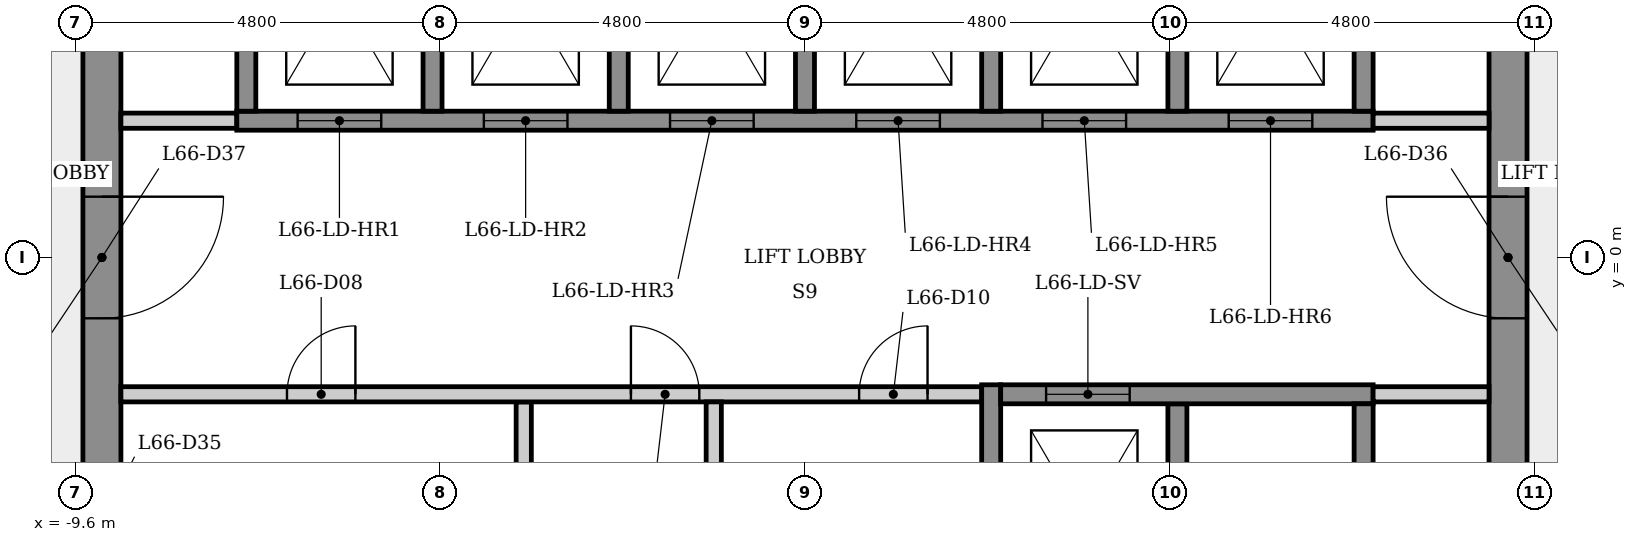
"""IFC4 building model, lengths in metres.
Left out: names, types, materials, properties, quantities, classifications, styles, units other than length and angle.
Written with IfcOpenShell. Run it as: python <this file> out.ifc"""

import sys

from ifc_helpers import new_model, si_unit, direction, frame, frame_2d, origin, place, context, subcontext, project, spatial, rectangle, extrude, element, fill, save


model = new_model("IFC4")
c1 = context("Model", 3, precision=1e-05, world=origin(), true_north=direction((0.0, 1.0)))
c2 = subcontext(c1, "Body", "Model", "MODEL_VIEW")
j1 = project(units=[si_unit("LENGTHUNIT", "METRE"), si_unit("PLANEANGLEUNIT", "RADIAN")], contexts=[c1])
p1 = place(None, origin())
s1 = spatial("IfcSite", under=j1, at=p1, CompositionType="ELEMENT")
p2 = place(p1, origin())
s2 = spatial("IfcBuilding", under=s1, at=p2, CompositionType="ELEMENT")
p3 = place(p2, frame((0.0, 0.0, 246.1)))
s3 = spatial("IfcBuildingStorey", under=s2, at=p3, CompositionType="ELEMENT", Elevation=246.1)
p4 = place(p3, frame((9.25, -5.485, 0.0), z_axis=(0.0, 0.0, 1.0), x_axis=(0.0, 1.0, 0.0)))
e1 = element("IfcWall", 1, at=p4, inside=s3, PredefinedType="SHEAR", context=c2, shape_type="SweptSolid", body=[
    extrude(rectangle(XDim=10.97, YDim=0.5, at=frame_2d((5.485, 0.0))), origin(), (0.0, 0.0, 1.0), 3.4),
])
p5 = place(p4, frame((4.685, 0.0, 0.0)))
e2 = element("IfcOpeningElement", 2, at=p5, cuts=e1, PredefinedType="OPENING", context=c2, shape_type="SweptSolid", body=[
    extrude(rectangle(XDim=1.6, YDim=2.1, at=frame_2d((0.8, 1.05))), frame((0.0, 0.26, 0.0), z_axis=(0.0, -1.0, 0.0), x_axis=(1.0, 0.0, 0.0)), (0.0, 0.0, 1.0), 0.52),
])
p6 = place(p3, frame((-9.25, 5.485, 0.0), z_axis=(0.0, 0.0, 1.0), x_axis=(0.0, -1.0, 0.0)))
e3 = element("IfcWall", 3, at=p6, inside=s3, PredefinedType="SHEAR", context=c2, shape_type="SweptSolid", body=[
    extrude(rectangle(XDim=10.97, YDim=0.5, at=frame_2d((5.485, 0.0))), origin(), (0.0, 0.0, 1.0), 3.4),
])
p7 = place(p6, frame((8.51, 0.0, 0.0)))
e4 = element("IfcOpeningElement", 4, at=p7, cuts=e3, PredefinedType="OPENING", context=c2, shape_type="SweptSolid", body=[
    extrude(rectangle(XDim=0.9, YDim=2.1, at=frame_2d((0.45, 1.05))), frame((0.0, 0.26, 0.0), z_axis=(0.0, -1.0, 0.0), x_axis=(1.0, 0.0, 0.0)), (0.0, 0.0, 1.0), 0.52),
])
p8 = place(p6, frame((4.685, 0.0, 0.0)))
e5 = element("IfcOpeningElement", 5, at=p8, cuts=e3, PredefinedType="OPENING", context=c2, shape_type="SweptSolid", body=[
    extrude(rectangle(XDim=1.6, YDim=2.1, at=frame_2d((0.8, 1.05))), frame((0.0, 0.26, 0.0), z_axis=(0.0, -1.0, 0.0), x_axis=(1.0, 0.0, 0.0)), (0.0, 0.0, 1.0), 0.52),
])
p9 = place(p3, frame((-9.0, 1.8, 0.0), z_axis=(0.0, 0.0, 1.0), x_axis=(1.0, 0.0, 0.0)))
e6 = element("IfcWall", 6, at=p9, inside=s3, PredefinedType="PARTITIONING", context=c2, shape_type="SweptSolid", body=[
    extrude(rectangle(XDim=1.525, YDim=0.2, at=frame_2d((0.763, 0.0))), origin(), (0.0, 0.0, 1.0), 3.05),
])
p10 = place(p3, frame((-7.475, 1.8, 0.0), z_axis=(0.0, 0.0, 1.0), x_axis=(1.0, 0.0, 0.0)))
e7 = element("IfcWall", 7, at=p10, inside=s3, PredefinedType="SHEAR", context=c2, shape_type="SweptSolid", body=[
    extrude(rectangle(XDim=14.95, YDim=0.25, at=frame_2d((7.475, 0.0))), origin(), (0.0, 0.0, 1.0), 3.05),
])
p11 = place(p10, frame((0.8, 0.0, 0.0)))
e8 = element("IfcOpeningElement", 8, at=p11, cuts=e7, PredefinedType="OPENING", context=c2, shape_type="SweptSolid", body=[
    extrude(rectangle(XDim=1.1, YDim=2.1, at=frame_2d((0.55, 1.05))), frame((0.0, 0.135, 0.0), z_axis=(0.0, -1.0, 0.0), x_axis=(1.0, 0.0, 0.0)), (0.0, 0.0, 1.0), 0.27),
])
p12 = place(p10, frame((3.25, 0.0, 0.0)))
e9 = element("IfcOpeningElement", 9, at=p12, cuts=e7, PredefinedType="OPENING", context=c2, shape_type="SweptSolid", body=[
    extrude(rectangle(XDim=1.1, YDim=2.1, at=frame_2d((0.55, 1.05))), frame((0.0, 0.135, 0.0), z_axis=(0.0, -1.0, 0.0), x_axis=(1.0, 0.0, 0.0)), (0.0, 0.0, 1.0), 0.27),
])
p13 = place(p10, frame((5.7, 0.0, 0.0)))
e10 = element("IfcOpeningElement", 10, at=p13, cuts=e7, PredefinedType="OPENING", context=c2, shape_type="SweptSolid", body=[
    extrude(rectangle(XDim=1.1, YDim=2.1, at=frame_2d((0.55, 1.05))), frame((0.0, 0.135, 0.0), z_axis=(0.0, -1.0, 0.0), x_axis=(1.0, 0.0, 0.0)), (0.0, 0.0, 1.0), 0.27),
])
p14 = place(p10, frame((8.15, 0.0, 0.0)))
e11 = element("IfcOpeningElement", 11, at=p14, cuts=e7, PredefinedType="OPENING", context=c2, shape_type="SweptSolid", body=[
    extrude(rectangle(XDim=1.1, YDim=2.1, at=frame_2d((0.55, 1.05))), frame((0.0, 0.135, 0.0), z_axis=(0.0, -1.0, 0.0), x_axis=(1.0, 0.0, 0.0)), (0.0, 0.0, 1.0), 0.27),
])
p15 = place(p10, frame((10.6, 0.0, 0.0)))
e12 = element("IfcOpeningElement", 12, at=p15, cuts=e7, PredefinedType="OPENING", context=c2, shape_type="SweptSolid", body=[
    extrude(rectangle(XDim=1.1, YDim=2.1, at=frame_2d((0.55, 1.05))), frame((0.0, 0.135, 0.0), z_axis=(0.0, -1.0, 0.0), x_axis=(1.0, 0.0, 0.0)), (0.0, 0.0, 1.0), 0.27),
])
p16 = place(p10, frame((13.05, 0.0, 0.0)))
e13 = element("IfcOpeningElement", 13, at=p16, cuts=e7, PredefinedType="OPENING", context=c2, shape_type="SweptSolid", body=[
    extrude(rectangle(XDim=1.1, YDim=2.1, at=frame_2d((0.55, 1.05))), frame((0.0, 0.135, 0.0), z_axis=(0.0, -1.0, 0.0), x_axis=(1.0, 0.0, 0.0)), (0.0, 0.0, 1.0), 0.27),
])
p17 = place(p3, frame((-7.35, 1.925, 0.0), z_axis=(0.0, 0.0, 1.0), x_axis=(0.0, 1.0, 0.0)))
e14 = element("IfcWall", 14, at=p17, inside=s3, PredefinedType="SHEAR", context=c2, shape_type="SweptSolid", body=[
    extrude(rectangle(XDim=3.35, YDim=0.25, at=frame_2d((1.675, 0.0))), origin(), (0.0, 0.0, 1.0), 3.05),
])
p18 = place(p3, frame((-4.9, 5.025, 0.0), z_axis=(0.0, 0.0, 1.0), x_axis=(0.0, -1.0, 0.0)))
e15 = element("IfcWall", 15, at=p18, inside=s3, PredefinedType="SHEAR", context=c2, shape_type="SweptSolid", body=[
    extrude(rectangle(XDim=3.1, YDim=0.25, at=frame_2d((1.55, 0.0))), origin(), (0.0, 0.0, 1.0), 3.4),
])
p19 = place(p3, frame((-3.7, -1.9, 0.0), z_axis=(0.0, 0.0, 1.0), x_axis=(0.0, -1.0, 0.0)))
e16 = element("IfcWall", 16, at=p19, inside=s3, PredefinedType="PARTITIONING", context=c2, shape_type="SweptSolid", body=[
    extrude(rectangle(XDim=3.15, YDim=0.2, at=frame_2d((1.575, 0.0))), origin(), (0.0, 0.0, 1.0), 3.05),
])
p20 = place(p3, frame((-9.0, -1.8, 0.0), z_axis=(0.0, 0.0, 1.0), x_axis=(1.0, 0.0, 0.0)))
e17 = element("IfcWall", 17, at=p20, inside=s3, PredefinedType="PARTITIONING", context=c2, shape_type="SweptSolid", body=[
    extrude(rectangle(XDim=11.325, YDim=0.2, at=frame_2d((5.663, 0.0))), origin(), (0.0, 0.0, 1.0), 3.05),
])
p21 = place(p20, frame((2.185, 0.0, 0.0)))
e18 = element("IfcOpeningElement", 18, at=p21, cuts=e17, PredefinedType="OPENING", context=c2, shape_type="SweptSolid", body=[
    extrude(rectangle(XDim=0.9, YDim=2.1, at=frame_2d((0.45, 1.05))), frame((0.0, 0.11, 0.0), z_axis=(0.0, -1.0, 0.0), x_axis=(1.0, 0.0, 0.0)), (0.0, 0.0, 1.0), 0.22),
])
p22 = place(p20, frame((6.71, 0.0, 0.0)))
e19 = element("IfcOpeningElement", 19, at=p22, cuts=e17, PredefinedType="OPENING", context=c2, shape_type="SweptSolid", body=[
    extrude(rectangle(XDim=0.9, YDim=2.1, at=frame_2d((0.45, 1.05))), frame((0.0, 0.11, 0.0), z_axis=(0.0, -1.0, 0.0), x_axis=(1.0, 0.0, 0.0)), (0.0, 0.0, 1.0), 0.22),
])
p23 = place(p20, frame((9.713, 0.0, 0.0)))
e20 = element("IfcOpeningElement", 20, at=p23, cuts=e17, PredefinedType="OPENING", context=c2, shape_type="SweptSolid", body=[
    extrude(rectangle(XDim=0.9, YDim=2.1, at=frame_2d((0.45, 1.05))), frame((0.0, 0.11, 0.0), z_axis=(0.0, -1.0, 0.0), x_axis=(1.0, 0.0, 0.0)), (0.0, 0.0, 1.0), 0.22),
])
p24 = place(p3, frame((-2.45, 5.025, 0.0), z_axis=(0.0, 0.0, 1.0), x_axis=(0.0, -1.0, 0.0)))
e21 = element("IfcWall", 21, at=p24, inside=s3, PredefinedType="SHEAR", context=c2, shape_type="SweptSolid", body=[
    extrude(rectangle(XDim=3.1, YDim=0.25, at=frame_2d((1.55, 0.0))), origin(), (0.0, 0.0, 1.0), 3.4),
])
p25 = place(p3, frame((-1.2, -1.9, 0.0), z_axis=(0.0, 0.0, 1.0), x_axis=(0.0, -1.0, 0.0)))
e22 = element("IfcWall", 22, at=p25, inside=s3, PredefinedType="PARTITIONING", context=c2, shape_type="SweptSolid", body=[
    extrude(rectangle(XDim=3.15, YDim=0.2, at=frame_2d((1.575, 0.0))), origin(), (0.0, 0.0, 1.0), 3.05),
])
p26 = place(p3, frame((0.0, 5.025, 0.0), z_axis=(0.0, 0.0, 1.0), x_axis=(0.0, -1.0, 0.0)))
e23 = element("IfcWall", 23, at=p26, inside=s3, PredefinedType="SHEAR", context=c2, shape_type="SweptSolid", body=[
    extrude(rectangle(XDim=3.1, YDim=0.25, at=frame_2d((1.55, 0.0))), origin(), (0.0, 0.0, 1.0), 3.4),
])
p27 = place(p3, frame((2.45, -5.275, 0.0), z_axis=(0.0, 0.0, 1.0), x_axis=(0.0, 1.0, 0.0)))
e24 = element("IfcWall", 24, at=p27, inside=s3, PredefinedType="SHEAR", context=c2, shape_type="SweptSolid", body=[
    extrude(rectangle(XDim=3.6, YDim=0.25, at=frame_2d((1.8, 0.0))), origin(), (0.0, 0.0, 1.0), 3.05),
])
for number, where, z_axis, x_axis in (
    (25, (2.45, 5.025, 0.0), (0.0, 0.0, 1.0), (0.0, -1.0, 0.0)),
    (26, (4.9, -1.925, 0.0), (0.0, 0.0, 1.0), (0.0, -1.0, 0.0)),
    (27, (4.9, 5.025, 0.0), (0.0, 0.0, 1.0), (0.0, -1.0, 0.0)),
):
    element("IfcWall", number, at=place(p3, frame(where, z_axis=z_axis, x_axis=x_axis)), inside=s3, PredefinedType="SHEAR", context=c2, shape_type="SweptSolid", body=[
        extrude(rectangle(XDim=3.1, YDim=0.25, at=frame_2d((1.55, 0.0))), origin(), (0.0, 0.0, 1.0), 3.4),
    ])
p28 = place(p3, frame((2.575, -1.8, 0.0), z_axis=(0.0, 0.0, 1.0), x_axis=(1.0, 0.0, 0.0)))
e28 = element("IfcWall", 28, at=p28, inside=s3, PredefinedType="SHEAR", context=c2, shape_type="SweptSolid", body=[
    extrude(rectangle(XDim=4.9, YDim=0.25, at=frame_2d((2.45, 0.0))), origin(), (0.0, 0.0, 1.0), 3.05),
])
p29 = place(p28, frame((0.597, 0.0, 0.0)))
e29 = element("IfcOpeningElement", 29, at=p29, cuts=e28, PredefinedType="OPENING", context=c2, shape_type="SweptSolid", body=[
    extrude(rectangle(XDim=1.1, YDim=2.1, at=frame_2d((0.55, 1.05))), frame((0.0, 0.135, 0.0), z_axis=(0.0, -1.0, 0.0), x_axis=(1.0, 0.0, 0.0)), (0.0, 0.0, 1.0), 0.27),
])
p30 = place(p3, frame((7.475, 1.8, 0.0), z_axis=(0.0, 0.0, 1.0), x_axis=(1.0, 0.0, 0.0)))
e30 = element("IfcWall", 30, at=p30, inside=s3, PredefinedType="PARTITIONING", context=c2, shape_type="SweptSolid", body=[
    extrude(rectangle(XDim=1.525, YDim=0.2, at=frame_2d((0.763, 0.0))), origin(), (0.0, 0.0, 1.0), 3.05),
])
for number, where, z_axis, x_axis in (
    (31, (7.35, -1.925, 0.0), (0.0, 0.0, 1.0), (0.0, -1.0, 0.0)),
    (32, (7.35, 5.025, 0.0), (0.0, 0.0, 1.0), (0.0, -1.0, 0.0)),
):
    element("IfcWall", number, at=place(p3, frame(where, z_axis=z_axis, x_axis=x_axis)), inside=s3, PredefinedType="SHEAR", context=c2, shape_type="SweptSolid", body=[
        extrude(rectangle(XDim=3.1, YDim=0.25, at=frame_2d((1.55, 0.0))), origin(), (0.0, 0.0, 1.0), 3.4),
    ])
p31 = place(p3, frame((9.0, -1.8, 0.0), z_axis=(0.0, 0.0, 1.0), x_axis=(-1.0, 0.0, 0.0)))
e33 = element("IfcWall", 33, at=p31, inside=s3, PredefinedType="PARTITIONING", context=c2, shape_type="SweptSolid", body=[
    extrude(rectangle(XDim=1.525, YDim=0.2, at=frame_2d((0.763, 0.0))), origin(), (0.0, 0.0, 1.0), 3.05),
])
p32 = place(p11, origin())
e34 = element("IfcDoor", 34, at=p32, inside=s3, OperationType="SLIDING_TO_LEFT", PredefinedType="DOOR", context=c2, shape_type="SweptSolid", body=[
    extrude(rectangle(XDim=1.1, YDim=2.1, at=frame_2d((0.55, 1.05))), frame((0.0, 0.025, 0.0), z_axis=(0.0, -1.0, 0.0), x_axis=(1.0, 0.0, 0.0)), (0.0, 0.0, 1.0), 0.05),
])
fill(e8, e34)
p33 = place(p12, origin())
e35 = element("IfcDoor", 35, at=p33, inside=s3, OperationType="SLIDING_TO_LEFT", PredefinedType="DOOR", context=c2, shape_type="SweptSolid", body=[
    extrude(rectangle(XDim=1.1, YDim=2.1, at=frame_2d((0.55, 1.05))), frame((0.0, 0.025, 0.0), z_axis=(0.0, -1.0, 0.0), x_axis=(1.0, 0.0, 0.0)), (0.0, 0.0, 1.0), 0.05),
])
fill(e9, e35)
p34 = place(p13, origin())
e36 = element("IfcDoor", 36, at=p34, inside=s3, OperationType="SLIDING_TO_LEFT", PredefinedType="DOOR", context=c2, shape_type="SweptSolid", body=[
    extrude(rectangle(XDim=1.1, YDim=2.1, at=frame_2d((0.55, 1.05))), frame((0.0, 0.025, 0.0), z_axis=(0.0, -1.0, 0.0), x_axis=(1.0, 0.0, 0.0)), (0.0, 0.0, 1.0), 0.05),
])
fill(e10, e36)
p35 = place(p14, origin())
e37 = element("IfcDoor", 37, at=p35, inside=s3, OperationType="SLIDING_TO_LEFT", PredefinedType="DOOR", context=c2, shape_type="SweptSolid", body=[
    extrude(rectangle(XDim=1.1, YDim=2.1, at=frame_2d((0.55, 1.05))), frame((0.0, 0.025, 0.0), z_axis=(0.0, -1.0, 0.0), x_axis=(1.0, 0.0, 0.0)), (0.0, 0.0, 1.0), 0.05),
])
fill(e11, e37)
p36 = place(p15, origin())
e38 = element("IfcDoor", 38, at=p36, inside=s3, OperationType="SLIDING_TO_LEFT", PredefinedType="DOOR", context=c2, shape_type="SweptSolid", body=[
    extrude(rectangle(XDim=1.1, YDim=2.1, at=frame_2d((0.55, 1.05))), frame((0.0, 0.025, 0.0), z_axis=(0.0, -1.0, 0.0), x_axis=(1.0, 0.0, 0.0)), (0.0, 0.0, 1.0), 0.05),
])
fill(e12, e38)
p37 = place(p16, origin())
e39 = element("IfcDoor", 39, at=p37, inside=s3, OperationType="SLIDING_TO_LEFT", PredefinedType="DOOR", context=c2, shape_type="SweptSolid", body=[
    extrude(rectangle(XDim=1.1, YDim=2.1, at=frame_2d((0.55, 1.05))), frame((0.0, 0.025, 0.0), z_axis=(0.0, -1.0, 0.0), x_axis=(1.0, 0.0, 0.0)), (0.0, 0.0, 1.0), 0.05),
])
fill(e13, e39)
p38 = place(p29, origin())
e40 = element("IfcDoor", 40, at=p38, inside=s3, OperationType="SLIDING_TO_LEFT", PredefinedType="DOOR", context=c2, shape_type="SweptSolid", body=[
    extrude(rectangle(XDim=1.1, YDim=2.1, at=frame_2d((0.55, 1.05))), frame((0.0, 0.025, 0.0), z_axis=(0.0, -1.0, 0.0), x_axis=(1.0, 0.0, 0.0)), (0.0, 0.0, 1.0), 0.05),
])
fill(e29, e40)
p39 = place(p21, origin())
e41 = element("IfcDoor", 41, at=p39, inside=s3, OperationType="SINGLE_SWING_RIGHT", PredefinedType="DOOR", context=c2, shape_type="SweptSolid", body=[
    extrude(rectangle(XDim=0.9, YDim=2.1, at=frame_2d((0.45, 1.05))), frame((0.0, 0.025, 0.0), z_axis=(0.0, -1.0, 0.0), x_axis=(1.0, 0.0, 0.0)), (0.0, 0.0, 1.0), 0.05),
])
fill(e18, e41)
p40 = place(p22, origin())
e42 = element("IfcDoor", 42, at=p40, inside=s3, OperationType="SINGLE_SWING_LEFT", PredefinedType="DOOR", context=c2, shape_type="SweptSolid", body=[
    extrude(rectangle(XDim=0.9, YDim=2.1, at=frame_2d((0.45, 1.05))), frame((0.0, 0.025, 0.0), z_axis=(0.0, -1.0, 0.0), x_axis=(1.0, 0.0, 0.0)), (0.0, 0.0, 1.0), 0.05),
])
fill(e19, e42)
p41 = place(p23, origin())
e43 = element("IfcDoor", 43, at=p41, inside=s3, OperationType="SINGLE_SWING_RIGHT", PredefinedType="DOOR", context=c2, shape_type="SweptSolid", body=[
    extrude(rectangle(XDim=0.9, YDim=2.1, at=frame_2d((0.45, 1.05))), frame((0.0, 0.025, 0.0), z_axis=(0.0, -1.0, 0.0), x_axis=(1.0, 0.0, 0.0)), (0.0, 0.0, 1.0), 0.05),
])
fill(e20, e43)
p42 = place(p5, origin())
e44 = element("IfcDoor", 44, at=p42, inside=s3, OperationType="SINGLE_SWING_RIGHT", PredefinedType="DOOR", context=c2, shape_type="SweptSolid", body=[
    extrude(rectangle(XDim=1.6, YDim=2.1, at=frame_2d((0.8, 1.05))), frame((0.0, 0.025, 0.0), z_axis=(0.0, -1.0, 0.0), x_axis=(1.0, 0.0, 0.0)), (0.0, 0.0, 1.0), 0.05),
])
fill(e2, e44)
p43 = place(p8, origin())
e45 = element("IfcDoor", 45, at=p43, inside=s3, OperationType="SINGLE_SWING_LEFT", PredefinedType="DOOR", context=c2, shape_type="SweptSolid", body=[
    extrude(rectangle(XDim=1.6, YDim=2.1, at=frame_2d((0.8, 1.05))), frame((0.0, 0.025, 0.0), z_axis=(0.0, -1.0, 0.0), x_axis=(1.0, 0.0, 0.0)), (0.0, 0.0, 1.0), 0.05),
])
fill(e5, e45)
save(model, sys.argv[1])
